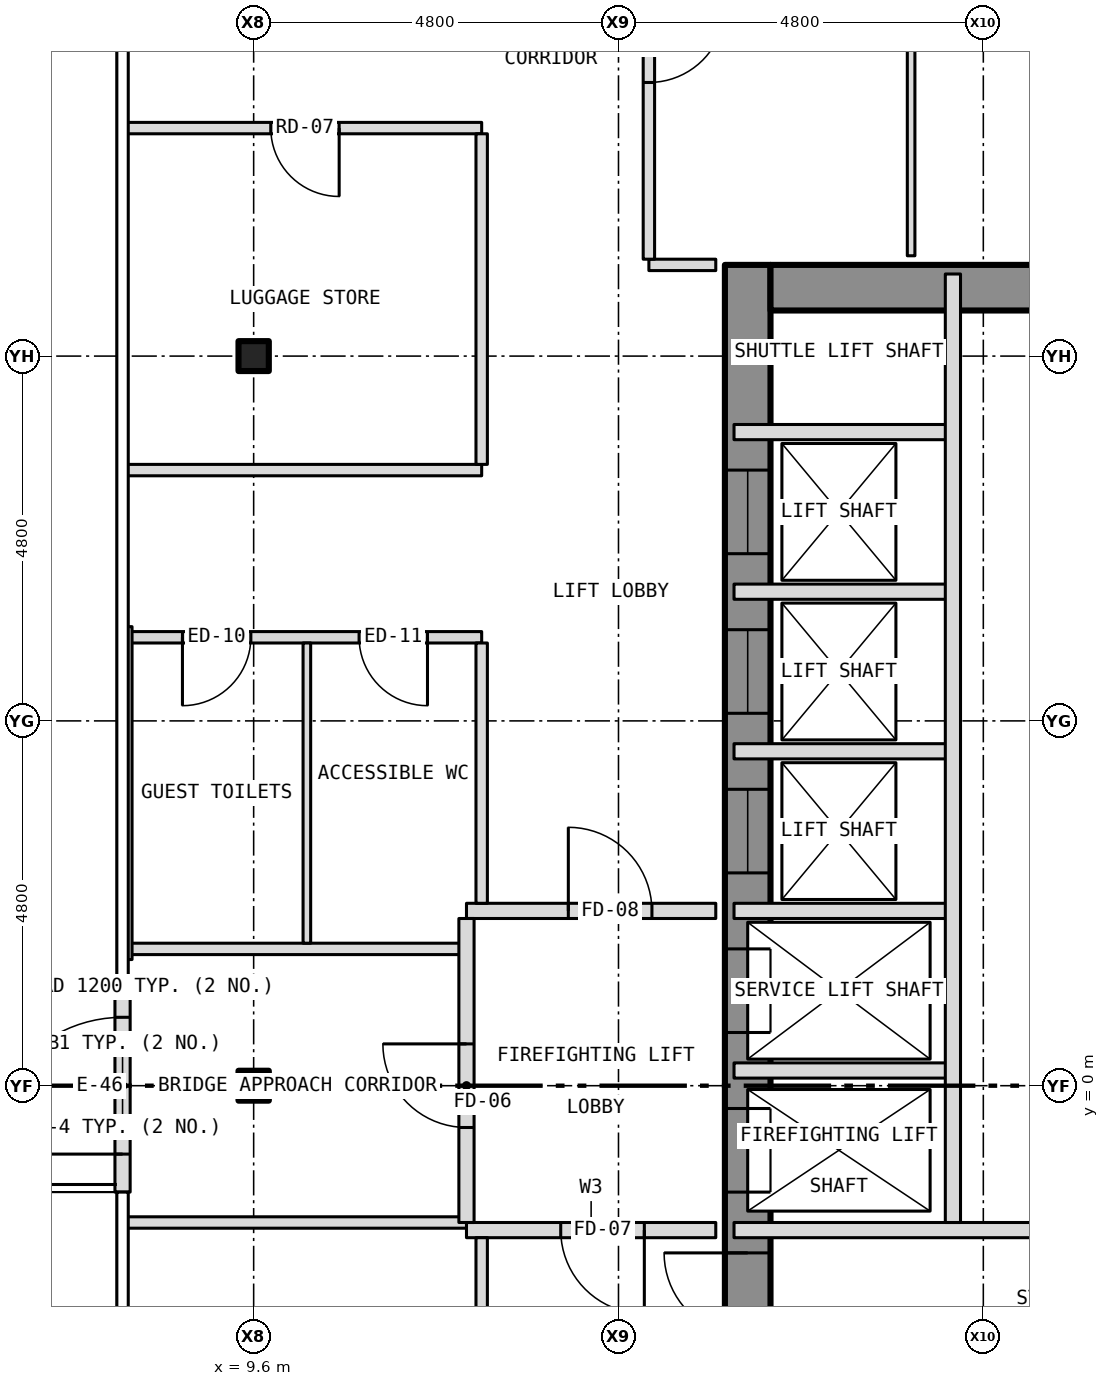
"""IFC4 building model, lengths in metres.
Left out: names, types, materials, properties, quantities, classifications, styles, units other than length and angle.
Written with IfcOpenShell. Run it as: python <this file> out.ifc"""

import sys

from ifc_helpers import new_model, si_unit, direction, frame, frame_2d, origin, origin_2d, place, context, subcontext, project, spatial, rectangle, i_section, extrude, element, fill, save


model = new_model("IFC4")
c1 = context("Model", 3, precision=1e-05, world=origin(), true_north=direction((0.0, 1.0)))
c2 = subcontext(c1, "Body", "Model", "MODEL_VIEW")
j1 = project(units=[si_unit("LENGTHUNIT", "METRE"), si_unit("PLANEANGLEUNIT", "RADIAN")], contexts=[c1])
p1 = place(None, origin())
s1 = spatial("IfcSite", under=j1, at=p1, CompositionType="ELEMENT")
p2 = place(p1, origin())
s2 = spatial("IfcBuilding", under=s1, at=p2, CompositionType="ELEMENT")
p3 = place(p2, frame((0.0, 0.0, 120.5)))
s3 = spatial("IfcBuildingStorey", under=s2, at=p3, CompositionType="ELEMENT", Elevation=120.5)
for number, where, z_axis, x_axis in (
    (1, (9.6, 0.0, -0.15), (0.0, 0.0, 1.0), (1.0, 0.0, 0.0)),
    (2, (9.6, 9.6, -0.15), (0.0, 0.0, 1.0), (1.0, 0.0, 0.0)),
):
    element("IfcColumn", number, at=place(p3, frame(where, z_axis=z_axis, x_axis=x_axis)), inside=s3, PredefinedType="COLUMN", context=c2, shape_type="SweptSolid", body=[
        extrude(i_section(OverallWidth=0.399, OverallDepth=0.394, WebThickness=0.023, FlangeThickness=0.037, at=origin_2d()), origin(), (0.0, 0.0, 1.0), 3.5),
    ])
p4 = place(p3, frame((16.1, -10.8, 0.0), z_axis=(0.0, 0.0, 1.0), x_axis=(0.0, 1.0, 0.0)))
e3 = element("IfcWall", 3, at=p4, inside=s3, PredefinedType="SHEAR", context=c2, shape_type="SweptSolid", body=[
    extrude(rectangle(XDim=21.6, YDim=0.6, at=frame_2d((10.8, 0.0))), origin(), (0.0, 0.0, 1.0), 3.25),
])
p5 = place(p4, frame((9.4, 0.0, 0.0)))
e4 = element("IfcOpeningElement", 4, at=p5, cuts=e3, PredefinedType="OPENING", context=c2, shape_type="SweptSolid", body=[
    extrude(rectangle(XDim=1.1, YDim=2.1, at=frame_2d((0.55, 1.05))), frame((0.0, 0.312, 0.0), z_axis=(0.0, -1.0, 0.0), x_axis=(1.0, 0.0, 0.0)), (0.0, 0.0, 1.0), 0.624),
])
p6 = place(p4, frame((11.5, 0.0, 0.0)))
e5 = element("IfcOpeningElement", 5, at=p6, cuts=e3, PredefinedType="OPENING", context=c2, shape_type="SweptSolid", body=[
    extrude(rectangle(XDim=1.1, YDim=2.1, at=frame_2d((0.55, 1.05))), frame((0.0, 0.312, 0.0), z_axis=(0.0, -1.0, 0.0), x_axis=(1.0, 0.0, 0.0)), (0.0, 0.0, 1.0), 0.624),
])
p7 = place(p4, frame((13.6, 0.0, 0.0)))
e6 = element("IfcOpeningElement", 6, at=p7, cuts=e3, PredefinedType="OPENING", context=c2, shape_type="SweptSolid", body=[
    extrude(rectangle(XDim=1.1, YDim=2.1, at=frame_2d((0.55, 1.05))), frame((0.0, 0.312, 0.0), z_axis=(0.0, -1.0, 0.0), x_axis=(1.0, 0.0, 0.0)), (0.0, 0.0, 1.0), 0.624),
])
p8 = place(p4, frame((15.7, 0.0, 0.0)))
e7 = element("IfcOpeningElement", 7, at=p8, cuts=e3, PredefinedType="OPENING", context=c2, shape_type="SweptSolid", body=[
    extrude(rectangle(XDim=1.1, YDim=2.1, at=frame_2d((0.55, 1.05))), frame((0.0, 0.312, 0.0), z_axis=(0.0, -1.0, 0.0), x_axis=(1.0, 0.0, 0.0)), (0.0, 0.0, 1.0), 0.624),
])
p9 = place(p4, frame((17.8, 0.0, 0.0)))
e8 = element("IfcOpeningElement", 8, at=p9, cuts=e3, PredefinedType="OPENING", context=c2, shape_type="SweptSolid", body=[
    extrude(rectangle(XDim=1.1, YDim=2.1, at=frame_2d((0.55, 1.05))), frame((0.0, 0.312, 0.0), z_axis=(0.0, -1.0, 0.0), x_axis=(1.0, 0.0, 0.0)), (0.0, 0.0, 1.0), 0.624),
])
p10 = place(p4, frame((5.642, 0.0, 0.0)))
e9 = element("IfcOpeningElement", 9, at=p10, cuts=e3, PredefinedType="OPENING", context=c2, shape_type="SweptSolid", body=[
    extrude(rectangle(XDim=1.1, YDim=2.1, at=frame_2d((0.55, 1.05))), frame((0.0, 0.312, 0.0), z_axis=(0.0, -1.0, 0.0), x_axis=(1.0, 0.0, 0.0)), (0.0, 0.0, 1.0), 0.624),
])
p11 = place(p4, frame((7.5, 0.0, 0.0)))
e10 = element("IfcOpeningElement", 10, at=p11, cuts=e3, PredefinedType="OPENING", context=c2, shape_type="SweptSolid", body=[
    extrude(rectangle(XDim=1.1, YDim=2.1, at=frame_2d((0.55, 1.05))), frame((0.0, 0.312, 0.0), z_axis=(0.0, -1.0, 0.0), x_axis=(1.0, 0.0, 0.0)), (0.0, 0.0, 1.0), 0.624),
])
p12 = place(p3, frame((16.4, 10.5, 0.0), z_axis=(0.0, 0.0, 1.0), x_axis=(1.0, 0.0, 0.0)))
e11 = element("IfcWall", 11, at=p12, inside=s3, PredefinedType="SHEAR", context=c2, shape_type="SweptSolid", body=[
    extrude(rectangle(XDim=5.8, YDim=0.6, at=frame_2d((2.9, 0.0))), origin(), (0.0, 0.0, 1.0), 3.25),
])
p13 = place(p3, frame((7.875, -1.4, 0.0), z_axis=(0.0, 0.0, 1.0), x_axis=(0.0, 1.0, 0.0)))
e12 = element("IfcWall", 12, at=p13, inside=s3, PredefinedType="SOLIDWALL", context=c2, shape_type="SweptSolid", body=[
    extrude(rectangle(XDim=2.8, YDim=0.2, at=frame_2d((1.4, 0.0))), origin(), (0.0, 0.0, 1.0), 3.5),
])
p14 = place(p13, frame((0.5, 0.0, 0.0)))
e13 = element("IfcOpeningElement", 13, at=p14, cuts=e12, PredefinedType="OPENING", context=c2, shape_type="SweptSolid", body=[
    extrude(rectangle(XDim=1.8, YDim=2.1, at=frame_2d((0.9, 1.05))), frame((0.0, 0.112, 0.0), z_axis=(0.0, -1.0, 0.0), x_axis=(1.0, 0.0, 0.0)), (0.0, 0.0, 1.0), 0.224),
])
p15 = place(p3, frame((12.4, -1.9, 0.0), z_axis=(0.0, 0.0, 1.0), x_axis=(1.0, 0.0, 0.0)))
e14 = element("IfcWall", 14, at=p15, inside=s3, PredefinedType="PARTITIONING", context=c2, shape_type="SweptSolid", body=[
    extrude(rectangle(XDim=3.28, YDim=0.2, at=frame_2d((1.64, 0.0))), origin(), (0.0, 0.0, 1.0), 3.35),
])
p16 = place(p15, frame((1.24, 0.0, 0.0)))
e15 = element("IfcOpeningElement", 15, at=p16, cuts=e14, PredefinedType="OPENING", context=c2, shape_type="SweptSolid", body=[
    extrude(rectangle(XDim=1.1, YDim=2.1, at=frame_2d((0.55, 1.05))), frame((0.0, 0.112, 0.0), z_axis=(0.0, -1.0, 0.0), x_axis=(1.0, 0.0, 0.0)), (0.0, 0.0, 1.0), 0.224),
])
p17 = place(p3, frame((15.92, -1.9, 0.0), z_axis=(0.0, 0.0, 1.0), x_axis=(1.0, 0.0, 0.0)))
e16 = element("IfcWall", 16, at=p17, inside=s3, PredefinedType="PARTITIONING", context=c2, shape_type="SweptSolid", body=[
    extrude(rectangle(XDim=6.76, YDim=0.2, at=frame_2d((3.38, 0.0))), origin(), (0.0, 0.0, 1.0), 3.25),
])
p18 = place(p3, frame((7.92, -1.8, 0.0), z_axis=(0.0, 0.0, 1.0), x_axis=(1.0, 0.0, 0.0)))
e17 = element("IfcWall", 17, at=p18, inside=s3, PredefinedType="PARTITIONING", context=c2, shape_type="SweptSolid", body=[
    extrude(rectangle(XDim=4.48, YDim=0.15, at=frame_2d((2.24, 0.0))), origin(), (0.0, 0.0, 1.0), 3.35),
])
p19 = place(p3, frame((15.92, 0.2, 0.0), z_axis=(0.0, 0.0, 1.0), x_axis=(1.0, 0.0, 0.0)))
e18 = element("IfcWall", 18, at=p19, inside=s3, PredefinedType="PARTITIONING", context=c2, shape_type="SweptSolid", body=[
    extrude(rectangle(XDim=2.88, YDim=0.2, at=frame_2d((1.44, 0.0))), origin(), (0.0, 0.0, 1.0), 3.25),
])
p20 = place(p3, frame((7.95, 1.8, 0.0), z_axis=(0.0, 0.0, 1.0), x_axis=(1.0, 0.0, 0.0)))
e19 = element("IfcWall", 19, at=p20, inside=s3, PredefinedType="PARTITIONING", context=c2, shape_type="SweptSolid", body=[
    extrude(rectangle(XDim=4.45, YDim=0.15, at=frame_2d((2.225, 0.0))), origin(), (0.0, 0.0, 1.0), 3.35),
])
p21 = place(p3, frame((12.4, 2.3, 0.0), z_axis=(0.0, 0.0, 1.0), x_axis=(1.0, 0.0, 0.0)))
e20 = element("IfcWall", 20, at=p21, inside=s3, PredefinedType="PARTITIONING", context=c2, shape_type="SweptSolid", body=[
    extrude(rectangle(XDim=3.28, YDim=0.2, at=frame_2d((1.64, 0.0))), origin(), (0.0, 0.0, 1.0), 3.35),
])
p22 = place(p21, frame((1.34, 0.0, 0.0)))
e21 = element("IfcOpeningElement", 21, at=p22, cuts=e20, PredefinedType="OPENING", context=c2, shape_type="SweptSolid", body=[
    extrude(rectangle(XDim=1.1, YDim=2.1, at=frame_2d((0.55, 1.05))), frame((0.0, 0.112, 0.0), z_axis=(0.0, -1.0, 0.0), x_axis=(1.0, 0.0, 0.0)), (0.0, 0.0, 1.0), 0.224),
])
for number, where, z_axis, x_axis in (
    (22, (15.92, 2.3, 0.0), (0.0, 0.0, 1.0), (1.0, 0.0, 0.0)),
    (23, (15.92, 4.4, 0.0), (0.0, 0.0, 1.0), (1.0, 0.0, 0.0)),
):
    element("IfcWall", number, at=place(p3, frame(where, z_axis=z_axis, x_axis=x_axis)), inside=s3, PredefinedType="PARTITIONING", context=c2, shape_type="SweptSolid", body=[
        extrude(rectangle(XDim=2.88, YDim=0.2, at=frame_2d((1.44, 0.0))), origin(), (0.0, 0.0, 1.0), 3.25),
    ])
p23 = place(p3, frame((7.95, 5.9, 0.0), z_axis=(0.0, 0.0, 1.0), x_axis=(1.0, 0.0, 0.0)))
e24 = element("IfcWall", 24, at=p23, inside=s3, PredefinedType="PARTITIONING", context=c2, shape_type="SweptSolid", body=[
    extrude(rectangle(XDim=4.65, YDim=0.15, at=frame_2d((2.325, 0.0))), origin(), (0.0, 0.0, 1.0), 3.35),
])
p24 = place(p23, frame((0.713, 0.0, 0.0)))
e25 = element("IfcOpeningElement", 25, at=p24, cuts=e24, PredefinedType="OPENING", context=c2, shape_type="SweptSolid", body=[
    extrude(rectangle(XDim=0.9, YDim=2.1, at=frame_2d((0.45, 1.05))), frame((0.0, 0.087, 0.0), z_axis=(0.0, -1.0, 0.0), x_axis=(1.0, 0.0, 0.0)), (0.0, 0.0, 1.0), 0.174),
])
p25 = place(p23, frame((3.037, 0.0, 0.0)))
e26 = element("IfcOpeningElement", 26, at=p25, cuts=e24, PredefinedType="OPENING", context=c2, shape_type="SweptSolid", body=[
    extrude(rectangle(XDim=0.9, YDim=2.1, at=frame_2d((0.45, 1.05))), frame((0.0, 0.087, 0.0), z_axis=(0.0, -1.0, 0.0), x_axis=(1.0, 0.0, 0.0)), (0.0, 0.0, 1.0), 0.174),
])
p26 = place(p3, frame((15.92, 6.5, 0.0), z_axis=(0.0, 0.0, 1.0), x_axis=(1.0, 0.0, 0.0)))
e27 = element("IfcWall", 27, at=p26, inside=s3, PredefinedType="PARTITIONING", context=c2, shape_type="SweptSolid", body=[
    extrude(rectangle(XDim=2.88, YDim=0.2, at=frame_2d((1.44, 0.0))), origin(), (0.0, 0.0, 1.0), 3.25),
])
p27 = place(p3, frame((7.92, 8.1, 0.0), z_axis=(0.0, 0.0, 1.0), x_axis=(1.0, 0.0, 0.0)))
e28 = element("IfcWall", 28, at=p27, inside=s3, PredefinedType="PARTITIONING", context=c2, shape_type="SweptSolid", body=[
    extrude(rectangle(XDim=4.68, YDim=0.15, at=frame_2d((2.34, 0.0))), origin(), (0.0, 0.0, 1.0), 3.35),
])
p28 = place(p3, frame((15.92, 8.6, 0.0), z_axis=(0.0, 0.0, 1.0), x_axis=(1.0, 0.0, 0.0)))
e29 = element("IfcWall", 29, at=p28, inside=s3, PredefinedType="PARTITIONING", context=c2, shape_type="SweptSolid", body=[
    extrude(rectangle(XDim=2.88, YDim=0.2, at=frame_2d((1.44, 0.0))), origin(), (0.0, 0.0, 1.0), 3.25),
])
p29 = place(p3, frame((14.8, 10.8, 0.0), z_axis=(0.0, 0.0, 1.0), x_axis=(1.0, 0.0, 0.0)))
e30 = element("IfcWall", 30, at=p29, inside=s3, PredefinedType="PARTITIONING", context=c2, shape_type="SweptSolid", body=[
    extrude(rectangle(XDim=0.88, YDim=0.15, at=frame_2d((0.44, 0.0))), origin(), (0.0, 0.0, 1.0), 3.35),
])
p30 = place(p3, frame((7.92, 12.6, 0.0), z_axis=(0.0, 0.0, 1.0), x_axis=(1.0, 0.0, 0.0)))
e31 = element("IfcWall", 31, at=p30, inside=s3, PredefinedType="PARTITIONING", context=c2, shape_type="SweptSolid", body=[
    extrude(rectangle(XDim=4.68, YDim=0.15, at=frame_2d((2.34, 0.0))), origin(), (0.0, 0.0, 1.0), 3.35),
])
p31 = place(p30, frame((1.905, 0.0, 0.0)))
e32 = element("IfcOpeningElement", 32, at=p31, cuts=e31, PredefinedType="OPENING", context=c2, shape_type="SweptSolid", body=[
    extrude(rectangle(XDim=0.9, YDim=2.1, at=frame_2d((0.45, 1.05))), frame((0.0, 0.087, 0.0), z_axis=(0.0, -1.0, 0.0), x_axis=(1.0, 0.0, 0.0)), (0.0, 0.0, 1.0), 0.174),
])
p32 = place(p3, frame((7.95, 1.66, 0.0), z_axis=(0.0, 0.0, 1.0), x_axis=(0.0, 1.0, 0.0)))
e33 = element("IfcWall", 33, at=p32, inside=s3, PredefinedType="PARTITIONING", context=c2, shape_type="SweptSolid", body=[
    extrude(rectangle(XDim=4.38, YDim=0.1, at=frame_2d((2.19, 0.0))), origin(), (0.0, 0.0, 1.0), 2.733),
])
p33 = place(p3, frame((10.3, 1.875, 0.0), z_axis=(0.0, 0.0, 1.0), x_axis=(0.0, 1.0, 0.0)))
e34 = element("IfcWall", 34, at=p33, inside=s3, PredefinedType="PARTITIONING", context=c2, shape_type="SweptSolid", body=[
    extrude(rectangle(XDim=3.95, YDim=0.1, at=frame_2d((1.975, 0.0))), origin(), (0.0, 0.0, 1.0), 3.35),
])
p34 = place(p3, frame((12.4, -1.8, 0.0), z_axis=(0.0, 0.0, 1.0), x_axis=(0.0, 1.0, 0.0)))
e35 = element("IfcWall", 35, at=p34, inside=s3, PredefinedType="PARTITIONING", context=c2, shape_type="SweptSolid", body=[
    extrude(rectangle(XDim=4.0, YDim=0.2, at=frame_2d((2.0, 0.0))), origin(), (0.0, 0.0, 1.0), 3.35),
])
p35 = place(p34, frame((1.25, 0.0, 0.0)))
e36 = element("IfcOpeningElement", 36, at=p35, cuts=e35, PredefinedType="OPENING", context=c2, shape_type="SweptSolid", body=[
    extrude(rectangle(XDim=1.1, YDim=2.1, at=frame_2d((0.55, 1.05))), frame((0.0, 0.112, 0.0), z_axis=(0.0, -1.0, 0.0), x_axis=(1.0, 0.0, 0.0)), (0.0, 0.0, 1.0), 0.224),
])
p36 = place(p3, frame((12.6, -12.525, 0.0), z_axis=(0.0, 0.0, 1.0), x_axis=(0.0, 1.0, 0.0)))
e37 = element("IfcWall", 37, at=p36, inside=s3, PredefinedType="PARTITIONING", context=c2, shape_type="SweptSolid", body=[
    extrude(rectangle(XDim=10.525, YDim=0.15, at=frame_2d((5.262, 0.0))), origin(), (0.0, 0.0, 1.0), 3.35),
])
p37 = place(p36, frame((4.825, 0.0, 0.0)))
e38 = element("IfcOpeningElement", 38, at=p37, cuts=e37, PredefinedType="OPENING", context=c2, shape_type="SweptSolid", body=[
    extrude(rectangle(XDim=0.9, YDim=2.1, at=frame_2d((0.45, 1.05))), frame((0.0, 0.087, 0.0), z_axis=(0.0, -1.0, 0.0), x_axis=(1.0, 0.0, 0.0)), (0.0, 0.0, 1.0), 0.174),
])
p38 = place(p3, frame((12.6, 2.4, 0.0), z_axis=(0.0, 0.0, 1.0), x_axis=(0.0, 1.0, 0.0)))
e39 = element("IfcWall", 39, at=p38, inside=s3, PredefinedType="PARTITIONING", context=c2, shape_type="SweptSolid", body=[
    extrude(rectangle(XDim=3.425, YDim=0.15, at=frame_2d((1.712, 0.0))), origin(), (0.0, 0.0, 1.0), 3.35),
])
p39 = place(p3, frame((12.6, 8.175, 0.0), z_axis=(0.0, 0.0, 1.0), x_axis=(0.0, 1.0, 0.0)))
e40 = element("IfcWall", 40, at=p39, inside=s3, PredefinedType="PARTITIONING", context=c2, shape_type="SweptSolid", body=[
    extrude(rectangle(XDim=4.35, YDim=0.15, at=frame_2d((2.175, 0.0))), origin(), (0.0, 0.0, 1.0), 3.35),
])
p40 = place(p3, frame((14.8, 10.875, 0.0), z_axis=(0.0, 0.0, 1.0), x_axis=(0.0, 1.0, 0.0)))
e41 = element("IfcWall", 41, at=p40, inside=s3, PredefinedType="PARTITIONING", context=c2, shape_type="SweptSolid", body=[
    extrude(rectangle(XDim=3.85, YDim=0.15, at=frame_2d((1.925, 0.0))), origin(), (0.0, 0.0, 1.0), 3.35),
])
p41 = place(p40, frame((2.325, 0.0, 0.0)))
e42 = element("IfcOpeningElement", 42, at=p41, cuts=e41, PredefinedType="OPENING", context=c2, shape_type="SweptSolid", body=[
    extrude(rectangle(XDim=1.0, YDim=2.1, at=frame_2d((0.5, 1.05))), frame((0.0, 0.087, 0.0), z_axis=(0.0, -1.0, 0.0), x_axis=(1.0, 0.0, 0.0)), (0.0, 0.0, 1.0), 0.174),
])
p42 = place(p3, frame((18.25, 10.92, 0.0), z_axis=(0.0, 0.0, 1.0), x_axis=(0.0, 1.0, 0.0)))
e43 = element("IfcWall", 43, at=p42, inside=s3, PredefinedType="PARTITIONING", context=c2, shape_type="SweptSolid", body=[
    extrude(rectangle(XDim=7.271, YDim=0.1, at=frame_2d((3.635, 0.0))), origin(), (0.0, 0.0, 1.0), 3.35),
])
p43 = place(p42, frame((5.43, 0.0, 0.0)))
e44 = element("IfcOpeningElement", 44, at=p43, cuts=e43, PredefinedType="OPENING", context=c2, shape_type="SweptSolid", body=[
    extrude(rectangle(XDim=0.9, YDim=2.1, at=frame_2d((0.45, 1.05))), frame((0.0, 0.062, 0.0), z_axis=(0.0, -1.0, 0.0), x_axis=(1.0, 0.0, 0.0)), (0.0, 0.0, 1.0), 0.124),
])
p44 = place(p3, frame((18.8, -1.8, 0.0), z_axis=(0.0, 0.0, 1.0), x_axis=(0.0, 1.0, 0.0)))
e45 = element("IfcWall", 45, at=p44, inside=s3, PredefinedType="PARTITIONING", context=c2, shape_type="SweptSolid", body=[
    extrude(rectangle(XDim=12.48, YDim=0.2, at=frame_2d((6.24, 0.0))), origin(), (0.0, 0.0, 1.0), 3.25),
])
p45 = place(p14, origin())
e46 = element("IfcDoor", 46, at=p45, inside=s3, OperationType="DOUBLE_DOOR_DOUBLE_SWING", PredefinedType="DOOR", context=c2, shape_type="SweptSolid", body=[
    extrude(rectangle(XDim=1.8, YDim=2.1, at=frame_2d((0.9, 1.05))), frame((0.0, 0.025, 0.0), z_axis=(0.0, -1.0, 0.0), x_axis=(1.0, 0.0, 0.0)), (0.0, 0.0, 1.0), 0.05),
])
fill(e13, e46)
p46 = place(p5, origin())
e47 = element("IfcDoor", 47, at=p46, inside=s3, OperationType="SLIDING_TO_LEFT", PredefinedType="DOOR", context=c2, shape_type="SweptSolid", body=[
    extrude(rectangle(XDim=1.1, YDim=2.1, at=frame_2d((0.55, 1.05))), frame((0.0, 0.025, 0.0), z_axis=(0.0, -1.0, 0.0), x_axis=(1.0, 0.0, 0.0)), (0.0, 0.0, 1.0), 0.05),
])
fill(e4, e47)
p47 = place(p6, origin())
e48 = element("IfcDoor", 48, at=p47, inside=s3, OperationType="SLIDING_TO_LEFT", PredefinedType="DOOR", context=c2, shape_type="SweptSolid", body=[
    extrude(rectangle(XDim=1.1, YDim=2.1, at=frame_2d((0.55, 1.05))), frame((0.0, 0.025, 0.0), z_axis=(0.0, -1.0, 0.0), x_axis=(1.0, 0.0, 0.0)), (0.0, 0.0, 1.0), 0.05),
])
fill(e5, e48)
p48 = place(p7, origin())
e49 = element("IfcDoor", 49, at=p48, inside=s3, OperationType="SLIDING_TO_LEFT", PredefinedType="DOOR", context=c2, shape_type="SweptSolid", body=[
    extrude(rectangle(XDim=1.1, YDim=2.1, at=frame_2d((0.55, 1.05))), frame((0.0, 0.025, 0.0), z_axis=(0.0, -1.0, 0.0), x_axis=(1.0, 0.0, 0.0)), (0.0, 0.0, 1.0), 0.05),
])
fill(e6, e49)
p49 = place(p8, origin())
e50 = element("IfcDoor", 50, at=p49, inside=s3, OperationType="SLIDING_TO_LEFT", PredefinedType="DOOR", context=c2, shape_type="SweptSolid", body=[
    extrude(rectangle(XDim=1.1, YDim=2.1, at=frame_2d((0.55, 1.05))), frame((0.0, 0.025, 0.0), z_axis=(0.0, -1.0, 0.0), x_axis=(1.0, 0.0, 0.0)), (0.0, 0.0, 1.0), 0.05),
])
fill(e7, e50)
p50 = place(p9, origin())
e51 = element("IfcDoor", 51, at=p50, inside=s3, OperationType="SLIDING_TO_LEFT", PredefinedType="DOOR", context=c2, shape_type="SweptSolid", body=[
    extrude(rectangle(XDim=1.1, YDim=2.1, at=frame_2d((0.55, 1.05))), frame((0.0, 0.025, 0.0), z_axis=(0.0, -1.0, 0.0), x_axis=(1.0, 0.0, 0.0)), (0.0, 0.0, 1.0), 0.05),
])
fill(e8, e51)
p51 = place(p11, origin())
e52 = element("IfcDoor", 52, at=p51, inside=s3, OperationType="SINGLE_SWING_RIGHT", PredefinedType="DOOR", context=c2, shape_type="SweptSolid", body=[
    extrude(rectangle(XDim=1.1, YDim=2.1, at=frame_2d((0.55, 1.05))), frame((0.0, 0.025, 0.0), z_axis=(0.0, -1.0, 0.0), x_axis=(1.0, 0.0, 0.0)), (0.0, 0.0, 1.0), 0.05),
])
fill(e10, e52)
p52 = place(p35, origin())
e53 = element("IfcDoor", 53, at=p52, inside=s3, OperationType="SINGLE_SWING_RIGHT", PredefinedType="DOOR", context=c2, shape_type="SweptSolid", body=[
    extrude(rectangle(XDim=1.1, YDim=2.1, at=frame_2d((0.55, 1.05))), frame((0.0, 0.025, 0.0), z_axis=(0.0, -1.0, 0.0), x_axis=(1.0, 0.0, 0.0)), (0.0, 0.0, 1.0), 0.05),
])
fill(e36, e53)
p53 = place(p16, origin())
e54 = element("IfcDoor", 54, at=p53, inside=s3, OperationType="SINGLE_SWING_RIGHT", PredefinedType="DOOR", context=c2, shape_type="SweptSolid", body=[
    extrude(rectangle(XDim=1.1, YDim=2.1, at=frame_2d((0.55, 1.05))), frame((0.0, 0.025, 0.0), z_axis=(0.0, -1.0, 0.0), x_axis=(1.0, 0.0, 0.0)), (0.0, 0.0, 1.0), 0.05),
])
fill(e15, e54)
p54 = place(p22, origin())
e55 = element("IfcDoor", 55, at=p54, inside=s3, OperationType="SINGLE_SWING_LEFT", PredefinedType="DOOR", context=c2, shape_type="SweptSolid", body=[
    extrude(rectangle(XDim=1.1, YDim=2.1, at=frame_2d((0.55, 1.05))), frame((0.0, 0.025, 0.0), z_axis=(0.0, -1.0, 0.0), x_axis=(1.0, 0.0, 0.0)), (0.0, 0.0, 1.0), 0.05),
])
fill(e21, e55)
p55 = place(p41, origin())
e56 = element("IfcDoor", 56, at=p55, inside=s3, OperationType="SINGLE_SWING_RIGHT", PredefinedType="DOOR", context=c2, shape_type="SweptSolid", body=[
    extrude(rectangle(XDim=1.0, YDim=2.1, at=frame_2d((0.5, 1.05))), frame((0.0, 0.025, 0.0), z_axis=(0.0, -1.0, 0.0), x_axis=(1.0, 0.0, 0.0)), (0.0, 0.0, 1.0), 0.05),
])
fill(e42, e56)
p56 = place(p24, origin())
e57 = element("IfcDoor", 57, at=p56, inside=s3, OperationType="SINGLE_SWING_LEFT", PredefinedType="DOOR", context=c2, shape_type="SweptSolid", body=[
    extrude(rectangle(XDim=0.9, YDim=2.1, at=frame_2d((0.45, 1.05))), frame((0.0, 0.025, 0.0), z_axis=(0.0, -1.0, 0.0), x_axis=(1.0, 0.0, 0.0)), (0.0, 0.0, 1.0), 0.05),
])
fill(e25, e57)
p57 = place(p25, origin())
e58 = element("IfcDoor", 58, at=p57, inside=s3, OperationType="SINGLE_SWING_RIGHT", PredefinedType="DOOR", context=c2, shape_type="SweptSolid", body=[
    extrude(rectangle(XDim=0.9, YDim=2.1, at=frame_2d((0.45, 1.05))), frame((0.0, 0.025, 0.0), z_axis=(0.0, -1.0, 0.0), x_axis=(1.0, 0.0, 0.0)), (0.0, 0.0, 1.0), 0.05),
])
fill(e26, e58)
p58 = place(p31, origin())
e59 = element("IfcDoor", 59, at=p58, inside=s3, OperationType="SINGLE_SWING_RIGHT", PredefinedType="DOOR", context=c2, shape_type="SweptSolid", body=[
    extrude(rectangle(XDim=0.9, YDim=2.1, at=frame_2d((0.45, 1.05))), frame((0.0, 0.025, 0.0), z_axis=(0.0, -1.0, 0.0), x_axis=(1.0, 0.0, 0.0)), (0.0, 0.0, 1.0), 0.05),
])
fill(e32, e59)
save(model, sys.argv[1])
